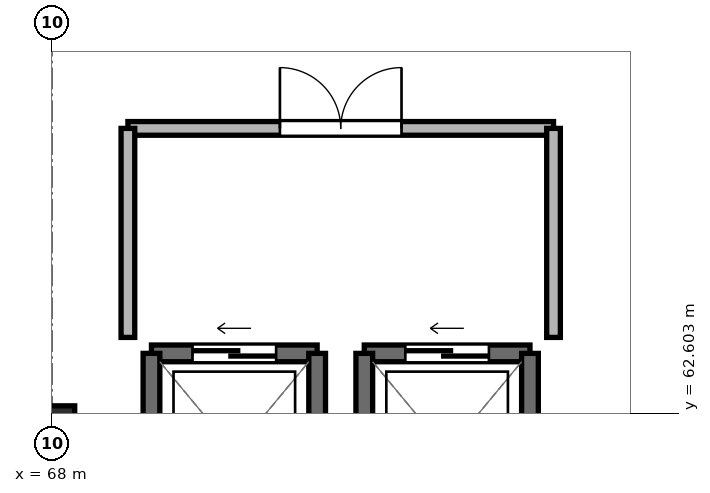
"""IFC4 building model, lengths in metres.
Left out: names, types, materials, properties, quantities, classifications, styles, units other than length and angle.
Written with IfcOpenShell. Run it as: python <this file> out.ifc"""

import sys

from ifc_helpers import new_model, si_unit, direction, frame, frame_2d, origin, origin_2d, place, context, subcontext, project, spatial, rectangle, extrude, element, fill, save


model = new_model("IFC4")
c1 = context("Model", 3, precision=1e-05, world=origin(), true_north=direction((0.0, 1.0)))
c2 = subcontext(c1, "Body", "Model", "MODEL_VIEW")
j1 = project(units=[si_unit("LENGTHUNIT", "METRE"), si_unit("PLANEANGLEUNIT", "RADIAN")], contexts=[c1])
p1 = place(None, origin())
s1 = spatial("IfcSite", under=j1, at=p1, CompositionType="ELEMENT")
p2 = place(p1, origin())
s2 = spatial("IfcBuilding", under=s1, at=p2, CompositionType="ELEMENT")
p3 = place(p2, frame((0.0, 0.0, 66.55)))
s3 = spatial("IfcBuildingStorey", under=s2, at=p3, CompositionType="ELEMENT", Elevation=66.55)
p4 = place(p3, frame((68.0, 62.4, -0.24), z_axis=(0.0, 0.0, 1.0), x_axis=(1.0, 0.0, 0.0)))
e1 = element("IfcColumn", 1, at=p4, inside=s3, PredefinedType="COLUMN", context=c2, shape_type="SweptSolid", body=[
    extrude(rectangle(XDim=0.6, YDim=0.6, at=origin_2d()), origin(), (0.0, 0.0, 1.0), 3.19),
])
p5 = place(p3, frame((71.49, 63.39, 0.0), z_axis=(0.0, 0.0, 1.0), x_axis=(-1.0, 0.0, 0.0)))
e2 = element("IfcWall", 2, at=p5, inside=s3, PredefinedType="SHEAR", context=c2, shape_type="SweptSolid", body=[
    extrude(rectangle(XDim=2.18, YDim=0.22, at=frame_2d((1.09, 0.0))), origin(), (0.0, 0.0, 1.0), 2.95),
])
p6 = place(p5, frame((0.54, 0.0, 0.0)))
e3 = element("IfcOpeningElement", 3, at=p6, cuts=e2, PredefinedType="OPENING", context=c2, shape_type="SweptSolid", body=[
    extrude(rectangle(XDim=1.1, YDim=2.2, at=frame_2d((0.55, 1.1))), frame((0.0, 0.122, 0.0), z_axis=(0.0, -1.0, 0.0), x_axis=(1.0, 0.0, 0.0)), (0.0, 0.0, 1.0), 0.244),
])
for number, where, z_axis, x_axis in (
    (4, (69.31, 63.39, 0.0), (0.0, 0.0, 1.0), (0.0, -1.0, 0.0)),
    (5, (71.49, 60.81, 0.0), (0.0, 0.0, 1.0), (0.0, 1.0, 0.0)),
):
    element("IfcWall", number, at=place(p3, frame(where, z_axis=z_axis, x_axis=x_axis)), inside=s3, PredefinedType="SHEAR", context=c2, shape_type="SweptSolid", body=[
        extrude(rectangle(XDim=2.58, YDim=0.22, at=frame_2d((1.29, 0.0))), origin(), (0.0, 0.0, 1.0), 2.95),
    ])
p7 = place(p3, frame((74.29, 63.39, 0.0), z_axis=(0.0, 0.0, 1.0), x_axis=(-1.0, 0.0, 0.0)))
e6 = element("IfcWall", 6, at=p7, inside=s3, PredefinedType="SHEAR", context=c2, shape_type="SweptSolid", body=[
    extrude(rectangle(XDim=2.18, YDim=0.22, at=frame_2d((1.09, 0.0))), origin(), (0.0, 0.0, 1.0), 2.95),
])
p8 = place(p7, frame((0.54, 0.0, 0.0)))
e7 = element("IfcOpeningElement", 7, at=p8, cuts=e6, PredefinedType="OPENING", context=c2, shape_type="SweptSolid", body=[
    extrude(rectangle(XDim=1.1, YDim=2.2, at=frame_2d((0.55, 1.1))), frame((0.0, 0.122, 0.0), z_axis=(0.0, -1.0, 0.0), x_axis=(1.0, 0.0, 0.0)), (0.0, 0.0, 1.0), 0.244),
])
for number, where, z_axis, x_axis in (
    (8, (72.11, 63.39, 0.0), (0.0, 0.0, 1.0), (0.0, -1.0, 0.0)),
    (9, (74.29, 60.81, 0.0), (0.0, 0.0, 1.0), (0.0, 1.0, 0.0)),
):
    element("IfcWall", number, at=place(p3, frame(where, z_axis=z_axis, x_axis=x_axis)), inside=s3, PredefinedType="SHEAR", context=c2, shape_type="SweptSolid", body=[
        extrude(rectangle(XDim=2.58, YDim=0.22, at=frame_2d((1.29, 0.0))), origin(), (0.0, 0.0, 1.0), 2.95),
    ])
p9 = place(p3, frame((69.0, 66.35, 0.0), z_axis=(0.0, 0.0, 1.0), x_axis=(1.0, 0.0, 0.0)))
e10 = element("IfcWall", 10, at=p9, inside=s3, PredefinedType="PARTITIONING", context=c2, shape_type="SweptSolid", body=[
    extrude(rectangle(XDim=5.6, YDim=0.18, at=frame_2d((2.8, 0.0))), origin(), (0.0, 0.0, 1.0), 2.53),
])
p10 = place(p9, frame((2.0, 0.0, 0.0)))
e11 = element("IfcOpeningElement", 11, at=p10, cuts=e10, PredefinedType="OPENING", context=c2, shape_type="SweptSolid", body=[
    extrude(rectangle(XDim=1.6, YDim=2.2, at=frame_2d((0.8, 1.1))), frame((0.0, 0.102, 0.0), z_axis=(0.0, -1.0, 0.0), x_axis=(1.0, 0.0, 0.0)), (0.0, 0.0, 1.0), 0.204),
])
for number, where, z_axis, x_axis in (
    (12, (69.0, 63.6, 0.0), (0.0, 0.0, 1.0), (0.0, 1.0, 0.0)),
    (13, (74.6, 63.6, 0.0), (0.0, 0.0, 1.0), (0.0, 1.0, 0.0)),
):
    element("IfcWall", number, at=place(p3, frame(where, z_axis=z_axis, x_axis=x_axis)), inside=s3, PredefinedType="PARTITIONING", context=c2, shape_type="SweptSolid", body=[
        extrude(rectangle(XDim=2.75, YDim=0.18, at=frame_2d((1.375, 0.0))), origin(), (0.0, 0.0, 1.0), 2.53),
    ])
p11 = place(p6, origin())
e14 = element("IfcDoor", 14, at=p11, inside=s3, OperationType="SLIDING_TO_RIGHT", PredefinedType="DOOR", context=c2, shape_type="SweptSolid", body=[
    extrude(rectangle(XDim=1.1, YDim=2.2, at=frame_2d((0.55, 1.1))), frame((0.0, 0.025, 0.0), z_axis=(0.0, -1.0, 0.0), x_axis=(1.0, 0.0, 0.0)), (0.0, 0.0, 1.0), 0.05),
])
fill(e3, e14)
p12 = place(p8, origin())
e15 = element("IfcDoor", 15, at=p12, inside=s3, OperationType="SLIDING_TO_RIGHT", PredefinedType="DOOR", context=c2, shape_type="SweptSolid", body=[
    extrude(rectangle(XDim=1.1, YDim=2.2, at=frame_2d((0.55, 1.1))), frame((0.0, 0.025, 0.0), z_axis=(0.0, -1.0, 0.0), x_axis=(1.0, 0.0, 0.0)), (0.0, 0.0, 1.0), 0.05),
])
fill(e7, e15)
p13 = place(p10, origin())
e16 = element("IfcDoor", 16, at=p13, inside=s3, OperationType="DOUBLE_DOOR_SINGLE_SWING", PredefinedType="DOOR", context=c2, shape_type="SweptSolid", body=[
    extrude(rectangle(XDim=1.6, YDim=2.2, at=frame_2d((0.8, 1.1))), frame((0.0, 0.025, 0.0), z_axis=(0.0, -1.0, 0.0), x_axis=(1.0, 0.0, 0.0)), (0.0, 0.0, 1.0), 0.05),
])
fill(e11, e16)
save(model, sys.argv[1])
